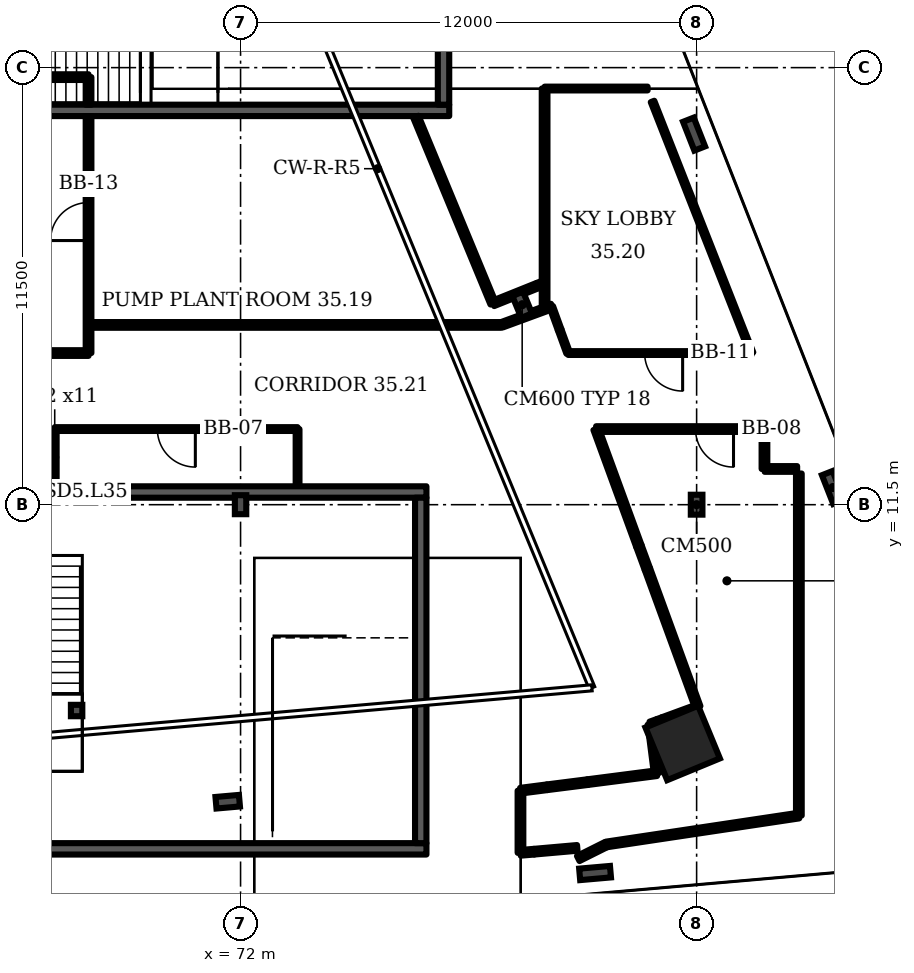
"""IFC4 building model, lengths in metres.
Left out: names, types, materials, properties, quantities, classifications, styles, units other than length and angle.
Written with IfcOpenShell. Run it as: python <this file> out.ifc"""

import sys

from ifc_helpers import new_model, si_unit, direction, frame, frame_2d, origin, origin_2d, place, context, subcontext, project, spatial, rectangle, i_section, extrude, element, fill, save


model = new_model("IFC4")
c1 = context("Model", 3, precision=1e-05, world=origin(), true_north=direction((0.0, 1.0)))
c2 = subcontext(c1, "Body", "Model", "MODEL_VIEW")
j1 = project(units=[si_unit("LENGTHUNIT", "METRE"), si_unit("PLANEANGLEUNIT", "RADIAN")], contexts=[c1])
p1 = place(None, origin())
s1 = spatial("IfcSite", under=j1, at=p1, CompositionType="ELEMENT")
p2 = place(p1, origin())
s2 = spatial("IfcBuilding", under=s1, at=p2, CompositionType="ELEMENT")
p3 = place(p2, frame((0.0, 0.0, 147.1)))
s3 = spatial("IfcBuildingStorey", under=s2, at=p3, CompositionType="ELEMENT", Elevation=147.1)
p4 = place(p3, frame((83.633, 5.231, 0.0), z_axis=(0.0, 0.0, 1.0), x_axis=(-0.381602, 0.924325, 0.0)))
e1 = element("IfcColumn", 1, at=p4, inside=s3, PredefinedType="COLUMN", context=c2, shape_type="SweptSolid", body=[
    extrude(rectangle(XDim=1.5, YDim=1.5, at=origin_2d()), origin(), (0.0, 0.0, 1.0), 4.8),
])
for number, where, z_axis, x_axis in (
    (2, (71.662, 3.685, 0.0), (0.0, 0.0, 1.0), (0.087, -0.996, 0.0)),
    (3, (79.41, 16.762, 0.0), (0.0, 0.0, 1.0), (0.924, 0.382, 0.0)),
):
    element("IfcColumn", number, at=place(p3, frame(where, z_axis=z_axis, x_axis=x_axis)), inside=s3, PredefinedType="COLUMN", context=c2, shape_type="SweptSolid", body=[
        extrude(i_section(OverallWidth=0.305, OverallDepth=0.62, WebThickness=0.021, FlangeThickness=0.04, FilletRadius=0.027, at=origin_2d()), origin(), (0.0, 0.0, 1.0), 4.8),
    ])
p5 = place(p3, frame((72.0, 11.5, 0.0), z_axis=(0.0, 0.0, 1.0), x_axis=(1.0, 0.0, 0.0)))
e4 = element("IfcColumn", 4, at=p5, inside=s3, PredefinedType="COLUMN", context=c2, shape_type="SweptSolid", body=[
    extrude(i_section(OverallWidth=0.3, OverallDepth=0.5, WebThickness=0.014, FlangeThickness=0.028, FilletRadius=0.027, at=origin_2d()), origin(), (0.0, 0.0, 1.0), 4.8),
])
for number, where, z_axis, x_axis in (
    (5, (81.328, 1.808, 0.0), (0.0, 0.0, 1.0), (0.087, -0.996, 0.0)),
    (6, (87.587, 11.952, 0.0), (0.0, 0.0, 1.0), (0.931, 0.366, 0.0)),
    (7, (83.933, 21.251, 0.0), (0.0, 0.0, 1.0), (0.931, 0.366, 0.0)),
):
    element("IfcColumn", number, at=place(p3, frame(where, z_axis=z_axis, x_axis=x_axis)), inside=s3, PredefinedType="COLUMN", context=c2, shape_type="SweptSolid", body=[
        extrude(i_section(OverallWidth=0.303, OverallDepth=0.814, WebThickness=0.021, FlangeThickness=0.04, FilletRadius=0.03, at=origin_2d()), origin(), (0.0, 0.0, 1.0), 4.8),
    ])
p6 = place(p3, frame((84.0, 11.5, 0.0), z_axis=(0.0, 0.0, 1.0), x_axis=(1.0, 0.0, 0.0)))
e8 = element("IfcColumn", 8, at=p6, inside=s3, PredefinedType="COLUMN", context=c2, shape_type="SweptSolid", body=[
    extrude(i_section(OverallWidth=0.306, OverallDepth=0.524, WebThickness=0.021, FlangeThickness=0.04, FilletRadius=0.027, at=origin_2d()), origin(), (0.0, 0.0, 1.0), 4.8),
])
p7 = place(p3, frame((63.786, 11.834, 0.0), z_axis=(0.0, 0.0, 1.0), x_axis=(1.0, 0.0, 0.0)))
e9 = element("IfcWall", 9, at=p7, inside=s3, PredefinedType="SHEAR", context=c2, shape_type="SweptSolid", body=[
    extrude(rectangle(XDim=13.105, YDim=0.3, at=frame_2d((6.552, 0.0))), origin(), (0.0, 0.0, 1.0), 4.4),
])
p8 = place(p7, frame((1.575, 0.0, 0.0)))
e10 = element("IfcOpeningElement", 10, at=p8, cuts=e9, PredefinedType="OPENING", context=c2, shape_type="SweptSolid", body=[
    extrude(rectangle(XDim=1.2, YDim=2.1, at=frame_2d((0.6, 1.05))), frame((0.0, 0.16, 0.0), z_axis=(0.0, -1.0, 0.0), x_axis=(1.0, 0.0, 0.0)), (0.0, 0.0, 1.0), 0.32),
])
p9 = place(p3, frame((52.0, 15.49, 0.0), z_axis=(0.0, 0.0, 1.0), x_axis=(1.0, 0.0, 0.0)))
e11 = element("IfcWall", 11, at=p9, inside=s3, PredefinedType="PARTITIONING", context=c2, shape_type="SweptSolid", body=[
    extrude(rectangle(XDim=16.0, YDim=0.15, at=frame_2d((8.0, 0.0))), origin(), (0.0, 0.0, 1.0), 4.4),
])
p10 = place(p9, frame((11.981, 0.0, 0.0)))
e12 = element("IfcOpeningElement", 12, at=p10, cuts=e11, PredefinedType="OPENING", context=c2, shape_type="SweptSolid", body=[
    extrude(rectangle(XDim=1.0, YDim=2.1, at=frame_2d((0.5, 1.05))), frame((0.0, 0.085, 0.0), z_axis=(0.0, -1.0, 0.0), x_axis=(1.0, 0.0, 0.0)), (0.0, 0.0, 1.0), 0.17),
])
p11 = place(p3, frame((67.11, 12.004, 0.0), z_axis=(0.0, 0.0, 1.0), x_axis=(0.0, 1.0, 0.0)))
e13 = element("IfcWall", 13, at=p11, inside=s3, PredefinedType="PARTITIONING", context=c2, shape_type="SweptSolid", body=[
    extrude(rectangle(XDim=1.486, YDim=0.1, at=frame_2d((0.743, 0.0))), origin(), (0.0, 0.0, 1.0), 4.4),
])
p12 = place(p3, frame((67.11, 13.49, 0.0), z_axis=(0.0, 0.0, 1.0), x_axis=(1.0, 0.0, 0.0)))
e14 = element("IfcWall", 14, at=p12, inside=s3, PredefinedType="PARTITIONING", context=c2, shape_type="SweptSolid", body=[
    extrude(rectangle(XDim=6.39, YDim=0.1, at=frame_2d((3.195, 0.0))), origin(), (0.0, 0.0, 1.0), 4.4),
])
p13 = place(p12, frame((2.7, 0.0, 0.0)))
e15 = element("IfcOpeningElement", 15, at=p13, cuts=e14, PredefinedType="OPENING", context=c2, shape_type="SweptSolid", body=[
    extrude(rectangle(XDim=1.0, YDim=2.1, at=frame_2d((0.5, 1.05))), frame((0.0, 0.06, 0.0), z_axis=(0.0, -1.0, 0.0), x_axis=(1.0, 0.0, 0.0)), (0.0, 0.0, 1.0), 0.12),
])
p14 = place(p3, frame((68.0, 15.49, 0.0), z_axis=(0.0, 0.0, 1.0), x_axis=(0.0, 1.0, 0.0)))
e16 = element("IfcWall", 16, at=p14, inside=s3, PredefinedType="PARTITIONING", context=c2, shape_type="SweptSolid", body=[
    extrude(rectangle(XDim=6.235, YDim=0.15, at=frame_2d((3.118, 0.0))), origin(), (0.0, 0.0, 1.0), 4.4),
])
p15 = place(p14, frame((2.96, 0.0, 0.0)))
e17 = element("IfcOpeningElement", 17, at=p15, cuts=e16, PredefinedType="OPENING", context=c2, shape_type="SweptSolid", body=[
    extrude(rectangle(XDim=1.0, YDim=2.1, at=frame_2d((0.5, 1.05))), frame((0.0, 0.085, 0.0), z_axis=(0.0, -1.0, 0.0), x_axis=(1.0, 0.0, 0.0)), (0.0, 0.0, 1.0), 0.17),
])
p16 = place(p3, frame((68.0, 16.23, 0.0), z_axis=(0.0, 0.0, 1.0), x_axis=(1.0, 0.0, 0.0)))
e18 = element("IfcWall", 18, at=p16, inside=s3, PredefinedType="PARTITIONING", context=c2, shape_type="SweptSolid", body=[
    extrude(rectangle(XDim=10.86, YDim=0.15, at=frame_2d((5.43, 0.0))), origin(), (0.0, 0.0, 1.0), 4.4),
])
p17 = place(p3, frame((73.5, 12.004, 0.0), z_axis=(0.0, 0.0, 1.0), x_axis=(0.0, 1.0, 0.0)))
e19 = element("IfcWall", 19, at=p17, inside=s3, PredefinedType="PARTITIONING", context=c2, shape_type="SweptSolid", body=[
    extrude(rectangle(XDim=1.486, YDim=0.1, at=frame_2d((0.743, 0.0))), origin(), (0.0, 0.0, 1.0), 4.4),
])
p18 = place(p3, frame((78.645, 16.795, 0.0), z_axis=(0.0, 0.0, 1.0), x_axis=(0.927928, 0.372759, 0.0)))
e20 = element("IfcWall", 20, at=p18, inside=s3, PredefinedType="PARTITIONING", context=c2, shape_type="SweptSolid", body=[
    extrude(rectangle(XDim=1.261, YDim=0.15, at=frame_2d((0.63, 0.0))), origin(), (0.0, 0.0, 1.0), 4.4),
])
p19 = place(p3, frame((78.645, 16.795, 0.0), z_axis=(0.0, 0.0, 1.0), x_axis=(-0.382344, 0.924021, 0.0)))
e21 = element("IfcWall", 21, at=p19, inside=s3, PredefinedType="PARTITIONING", context=c2, shape_type="SweptSolid", body=[
    extrude(rectangle(XDim=5.314, YDim=0.15, at=frame_2d((2.657, 0.0))), origin(), (0.0, 0.0, 1.0), 4.4),
])
p20 = place(p3, frame((78.88, 16.235, 0.0), z_axis=(0.0, 0.0, 1.0), x_axis=(0.938647, 0.344869, 0.0)))
e22 = element("IfcWall", 22, at=p20, inside=s3, PredefinedType="PARTITIONING", context=c2, shape_type="SweptSolid", body=[
    extrude(rectangle(XDim=1.247, YDim=0.15, at=frame_2d((0.623, 0.0))), origin(), (0.0, 0.0, 1.0), 4.4),
])
p21 = place(p3, frame((79.365, 2.34, 0.0), z_axis=(0.0, 0.0, 1.0), x_axis=(0.0, 1.0, 0.0)))
e23 = element("IfcWall", 23, at=p21, inside=s3, PredefinedType="PARTITIONING", context=c2, shape_type="SweptSolid", body=[
    extrude(rectangle(XDim=1.635, YDim=0.15, at=frame_2d((0.817, 0.0))), origin(), (0.0, 0.0, 1.0), 4.4),
])
p22 = place(p3, frame((79.365, 2.34, 0.0), z_axis=(0.0, 0.0, 1.0), x_axis=(0.996537, 0.083101, 0.0)))
e24 = element("IfcWall", 24, at=p22, inside=s3, PredefinedType="PARTITIONING", context=c2, shape_type="SweptSolid", body=[
    extrude(rectangle(XDim=0.361, YDim=0.15, at=frame_2d((0.181, 0.0))), origin(), (0.0, 0.0, 1.0), 4.4),
])
p23 = place(p3, frame((79.365, 3.975, 0.0), z_axis=(0.0, 0.0, 1.0), x_axis=(0.991865, 0.127313, 0.0)))
e25 = element("IfcWall", 25, at=p23, inside=s3, PredefinedType="PARTITIONING", context=c2, shape_type="SweptSolid", body=[
    extrude(rectangle(XDim=0.706, YDim=0.15, at=frame_2d((0.353, 0.0))), origin(), (0.0, 0.0, 1.0), 4.4),
])
p24 = place(p3, frame((79.725, 2.37, 0.0), z_axis=(0.0, 0.0, 1.0), x_axis=(0.996148, 0.087637, 0.0)))
e26 = element("IfcWall", 26, at=p24, inside=s3, PredefinedType="PARTITIONING", context=c2, shape_type="SweptSolid", body=[
    extrude(rectangle(XDim=1.139, YDim=0.15, at=frame_2d((0.57, 0.0))), origin(), (0.0, 0.0, 1.0), 4.4),
])
p25 = place(p3, frame((79.82, 17.265, 0.0), z_axis=(0.0, 0.0, 1.0), x_axis=(0.922795, 0.385281, 0.0)))
e27 = element("IfcWall", 27, at=p25, inside=s3, PredefinedType="PARTITIONING", context=c2, shape_type="SweptSolid", body=[
    extrude(rectangle(XDim=0.13, YDim=0.15, at=frame_2d((0.065, 0.0))), origin(), (0.0, 0.0, 1.0), 4.4),
])
p26 = place(p3, frame((80.0, 16.71, 0.0), z_axis=(0.0, 0.0, 1.0), x_axis=(0.0, 1.0, 0.0)))
e28 = element("IfcWall", 28, at=p26, inside=s3, PredefinedType="PARTITIONING", context=c2, shape_type="SweptSolid", body=[
    extrude(rectangle(XDim=5.74, YDim=0.15, at=frame_2d((2.87, 0.0))), origin(), (0.0, 0.0, 1.0), 4.4),
])
p27 = place(p3, frame((80.0, 22.45, 0.0), z_axis=(0.0, 0.0, 1.0), x_axis=(1.0, 0.0, 0.0)))
e29 = element("IfcWall", 29, at=p27, inside=s3, PredefinedType="PARTITIONING", context=c2, shape_type="SweptSolid", body=[
    extrude(rectangle(XDim=2.71, YDim=0.1, at=frame_2d((1.355, 0.0))), origin(), (0.0, 0.0, 1.0), 4.4),
])
p28 = place(p3, frame((80.025, 16.71, 0.0), z_axis=(0.0, 0.0, 1.0), x_axis=(1.0, 0.0, 0.0)))
e30 = element("IfcWall", 30, at=p28, inside=s3, PredefinedType="PARTITIONING", context=c2, shape_type="SweptSolid", body=[
    extrude(rectangle(XDim=0.145, YDim=0.15, at=frame_2d((0.073, 0.0))), origin(), (0.0, 0.0, 1.0), 4.4),
])
p29 = place(p3, frame((80.065, 4.065, 0.0), z_axis=(0.0, 0.0, 1.0), x_axis=(0.992059, 0.12577, 0.0)))
e31 = element("IfcWall", 31, at=p29, inside=s3, PredefinedType="PARTITIONING", context=c2, shape_type="SweptSolid", body=[
    extrude(rectangle(XDim=1.073, YDim=0.15, at=frame_2d((0.537, 0.0))), origin(), (0.0, 0.0, 1.0), 4.4),
])
p30 = place(p3, frame((80.395, 16.105, 0.0), z_axis=(0.0, 0.0, 1.0), x_axis=(-0.341711, 0.9398, 0.0)))
e32 = element("IfcWall", 32, at=p30, inside=s3, PredefinedType="PARTITIONING", context=c2, shape_type="SweptSolid", body=[
    extrude(rectangle(XDim=0.644, YDim=0.1, at=frame_2d((0.322, 0.0))), origin(), (0.0, 0.0, 1.0), 4.4),
])
p31 = place(p3, frame((80.62, 15.49, 0.0), z_axis=(0.0, 0.0, 1.0), x_axis=(1.0, 0.0, 0.0)))
e33 = element("IfcWall", 33, at=p31, inside=s3, PredefinedType="PARTITIONING", context=c2, shape_type="SweptSolid", body=[
    extrude(rectangle(XDim=4.825, YDim=0.1, at=frame_2d((2.413, 0.0))), origin(), (0.0, 0.0, 1.0), 4.4),
])
p32 = place(p31, frame((2.012, 0.0, 0.0)))
e34 = element("IfcOpeningElement", 34, at=p32, cuts=e33, PredefinedType="OPENING", context=c2, shape_type="SweptSolid", body=[
    extrude(rectangle(XDim=1.0, YDim=2.1, at=frame_2d((0.5, 1.05))), frame((0.0, 0.06, 0.0), z_axis=(0.0, -1.0, 0.0), x_axis=(1.0, 0.0, 0.0)), (0.0, 0.0, 1.0), 0.12),
])
p33 = place(p3, frame((80.62, 15.49, 0.0), z_axis=(0.0, 0.0, 1.0), x_axis=(-0.343719, 0.939076, 0.0)))
e35 = element("IfcWall", 35, at=p33, inside=s3, PredefinedType="PARTITIONING", context=c2, shape_type="SweptSolid", body=[
    extrude(rectangle(XDim=0.655, YDim=0.1, at=frame_2d((0.327, 0.0))), origin(), (0.0, 0.0, 1.0), 4.4),
])
p34 = place(p3, frame((80.885, 2.19, 0.0), z_axis=(0.0, 0.0, 1.0), x_axis=(0.894365, 0.44733, 0.0)))
e36 = element("IfcWall", 36, at=p34, inside=s3, PredefinedType="PARTITIONING", context=c2, shape_type="SweptSolid", body=[
    extrude(rectangle(XDim=0.827, YDim=0.15, at=frame_2d((0.414, 0.0))), origin(), (0.0, 0.0, 1.0), 4.4),
])
p35 = place(p3, frame((81.13, 4.2, 0.0), z_axis=(0.0, 0.0, 1.0), x_axis=(0.991763, 0.128111, 0.0)))
e37 = element("IfcWall", 37, at=p35, inside=s3, PredefinedType="PARTITIONING", context=c2, shape_type="SweptSolid", body=[
    extrude(rectangle(XDim=1.835, YDim=0.15, at=frame_2d((0.917, 0.0))), origin(), (0.0, 0.0, 1.0), 4.4),
])
p36 = place(p3, frame((81.355, 13.49, 0.0), z_axis=(0.0, 0.0, 1.0), x_axis=(1.0, 0.0, 0.0)))
e38 = element("IfcWall", 38, at=p36, inside=s3, PredefinedType="PARTITIONING", context=c2, shape_type="SweptSolid", body=[
    extrude(rectangle(XDim=4.43, YDim=0.15, at=frame_2d((2.215, 0.0))), origin(), (0.0, 0.0, 1.0), 4.4),
])
p37 = place(p36, frame((2.616, 0.0, 0.0)))
e39 = element("IfcOpeningElement", 39, at=p37, cuts=e38, PredefinedType="OPENING", context=c2, shape_type="SweptSolid", body=[
    extrude(rectangle(XDim=1.0, YDim=2.1, at=frame_2d((0.5, 1.05))), frame((0.0, 0.085, 0.0), z_axis=(0.0, -1.0, 0.0), x_axis=(1.0, 0.0, 0.0)), (0.0, 0.0, 1.0), 0.17),
])
p38 = place(p3, frame((81.625, 2.56, 0.0), z_axis=(0.0, 0.0, 1.0), x_axis=(0.98893, 0.148392, 0.0)))
e40 = element("IfcWall", 40, at=p38, inside=s3, PredefinedType="PARTITIONING", context=c2, shape_type="SweptSolid", body=[
    extrude(rectangle(XDim=5.122, YDim=0.15, at=frame_2d((2.561, 0.0))), origin(), (0.0, 0.0, 1.0), 4.4),
])
p39 = place(p3, frame((82.48, 10.415, 0.0), z_axis=(0.0, 0.0, 1.0), x_axis=(-0.343587, 0.939123, 0.0)))
e41 = element("IfcWall", 41, at=p39, inside=s3, PredefinedType="PARTITIONING", context=c2, shape_type="SweptSolid", body=[
    extrude(rectangle(XDim=3.274, YDim=0.15, at=frame_2d((1.637, 0.0))), origin(), (0.0, 0.0, 1.0), 4.4),
])
p40 = place(p3, frame((82.705, 9.805, 0.0), z_axis=(0.0, 0.0, 1.0), x_axis=(-0.34614, 0.938182, 0.0)))
e42 = element("IfcWall", 42, at=p40, inside=s3, PredefinedType="PARTITIONING", context=c2, shape_type="SweptSolid", body=[
    extrude(rectangle(XDim=0.65, YDim=0.15, at=frame_2d((0.325, 0.0))), origin(), (0.0, 0.0, 1.0), 4.4),
])
p41 = place(p3, frame((82.785, 5.72, 0.0), z_axis=(0.0, 0.0, 1.0), x_axis=(0.94113, 0.338053, 0.0)))
e43 = element("IfcWall", 43, at=p41, inside=s3, PredefinedType="PARTITIONING", context=c2, shape_type="SweptSolid", body=[
    extrude(rectangle(XDim=0.207, YDim=0.15, at=frame_2d((0.104, 0.0))), origin(), (0.0, 0.0, 1.0), 4.4),
])
p42 = place(p3, frame((82.95, 4.435, 0.0), z_axis=(0.0, 0.0, 1.0), x_axis=(-0.127397, 0.99185, 0.0)))
e44 = element("IfcWall", 44, at=p42, inside=s3, PredefinedType="PARTITIONING", context=c2, shape_type="SweptSolid", body=[
    extrude(rectangle(XDim=1.295, YDim=0.15, at=frame_2d((0.648, 0.0))), origin(), (0.0, 0.0, 1.0), 4.4),
])
p43 = place(p3, frame((82.98, 5.79, 0.0), z_axis=(0.0, 0.0, 1.0), x_axis=(0.941078, 0.3382, 0.0)))
e45 = element("IfcWall", 45, at=p43, inside=s3, PredefinedType="PARTITIONING", context=c2, shape_type="SweptSolid", body=[
    extrude(rectangle(XDim=0.133, YDim=0.15, at=frame_2d((0.066, 0.0))), origin(), (0.0, 0.0, 1.0), 4.4),
])
p44 = place(p3, frame((83.105, 5.835, 0.0), z_axis=(0.0, 0.0, 1.0), x_axis=(0.938584, 0.345064, 0.0)))
e46 = element("IfcWall", 46, at=p44, inside=s3, PredefinedType="PARTITIONING", context=c2, shape_type="SweptSolid", body=[
    extrude(rectangle(XDim=0.986, YDim=0.15, at=frame_2d((0.493, 0.0))), origin(), (0.0, 0.0, 1.0), 4.4),
])
p45 = place(p3, frame((84.03, 6.175, 0.0), z_axis=(0.0, 0.0, 1.0), x_axis=(-0.342884, 0.939377, 0.0)))
e47 = element("IfcWall", 47, at=p45, inside=s3, PredefinedType="PARTITIONING", context=c2, shape_type="SweptSolid", body=[
    extrude(rectangle(XDim=3.864, YDim=0.15, at=frame_2d((1.932, 0.0))), origin(), (0.0, 0.0, 1.0), 4.4),
])
p46 = place(p3, frame((85.445, 15.49, 0.0), z_axis=(0.0, 0.0, 1.0), x_axis=(-0.366214, 0.930531, 0.0)))
e48 = element("IfcWall", 48, at=p46, inside=s3, PredefinedType="PARTITIONING", context=c2, shape_type="SweptSolid", body=[
    extrude(rectangle(XDim=7.115, YDim=0.1, at=frame_2d((3.557, 0.0))), origin(), (0.0, 0.0, 1.0), 4.4),
])
p47 = place(p3, frame((85.785, 12.44, 0.0), z_axis=(0.0, 0.0, 1.0), x_axis=(0.0, 1.0, 0.0)))
e49 = element("IfcWall", 49, at=p47, inside=s3, PredefinedType="PARTITIONING", context=c2, shape_type="SweptSolid", body=[
    extrude(rectangle(XDim=1.05, YDim=0.15, at=frame_2d((0.525, 0.0))), origin(), (0.0, 0.0, 1.0), 4.4),
])
p48 = place(p3, frame((85.79, 12.44, 0.0), z_axis=(0.0, 0.0, 1.0), x_axis=(1.0, 0.0, 0.0)))
e50 = element("IfcWall", 50, at=p48, inside=s3, PredefinedType="PARTITIONING", context=c2, shape_type="SweptSolid", body=[
    extrude(rectangle(XDim=0.855, YDim=0.15, at=frame_2d((0.427, 0.0))), origin(), (0.0, 0.0, 1.0), 4.4),
])
p49 = place(p3, frame((86.69, 3.32, 0.0), z_axis=(0.0, 0.0, 1.0), x_axis=(0.0, 1.0, 0.0)))
e51 = element("IfcWall", 51, at=p49, inside=s3, PredefinedType="PARTITIONING", context=c2, shape_type="SweptSolid", body=[
    extrude(rectangle(XDim=9.0, YDim=0.15, at=frame_2d((4.5, 0.0))), origin(), (0.0, 0.0, 1.0), 4.4),
])
p50 = place(p3, frame((64.205, 22.75, 0.0), z_axis=(0.0, 0.0, 1.0), x_axis=(1.0, 0.0, 0.0)))
e52 = element("IfcWall", 52, at=p50, inside=s3, PredefinedType="PARTITIONING", context=c2, shape_type="SweptSolid", body=[
    extrude(rectangle(XDim=3.795, YDim=0.15, at=frame_2d((1.898, 0.0))), origin(), (0.0, 0.0, 1.0), 4.4),
])
p51 = place(p3, frame((68.0, 22.025, 0.0), z_axis=(0.0, 0.0, 1.0), x_axis=(0.0, 1.0, 0.0)))
e53 = element("IfcWall", 53, at=p51, inside=s3, PredefinedType="PARTITIONING", context=c2, shape_type="SweptSolid", body=[
    extrude(rectangle(XDim=0.725, YDim=0.15, at=frame_2d((0.363, 0.0))), origin(), (0.0, 0.0, 1.0), 4.4),
])
p52 = place(p3, frame((63.786, 2.445, 0.0), z_axis=(0.0, 0.0, 1.0), x_axis=(1.0, 0.0, 0.0)))
e54 = element("IfcWall", 54, at=p52, inside=s3, PredefinedType="SHEAR", context=c2, shape_type="SweptSolid", body=[
    extrude(rectangle(XDim=13.105, YDim=0.3, at=frame_2d((6.552, 0.0))), origin(), (0.0, 0.0, 1.0), 4.4),
])
p53 = place(p3, frame((76.741, 2.595, 0.0), z_axis=(0.0, 0.0, 1.0), x_axis=(0.0, 1.0, 0.0)))
e55 = element("IfcWall", 55, at=p53, inside=s3, PredefinedType="SHEAR", context=c2, shape_type="SweptSolid", body=[
    extrude(rectangle(XDim=9.089, YDim=0.3, at=frame_2d((4.544, 0.0))), origin(), (0.0, 0.0, 1.0), 4.4),
])
p54 = place(p3, frame((64.205, 21.875, 0.0), z_axis=(0.0, 0.0, 1.0), x_axis=(1.0, 0.0, 0.0)))
e56 = element("IfcWall", 56, at=p54, inside=s3, PredefinedType="SHEAR", context=c2, shape_type="SweptSolid", body=[
    extrude(rectangle(XDim=13.286, YDim=0.3, at=frame_2d((6.643, 0.0))), origin(), (0.0, 0.0, 1.0), 4.4),
])
p55 = place(p3, frame((77.34, 22.025, 0.0), z_axis=(0.0, 0.0, 1.0), x_axis=(0.0, 1.0, 0.0)))
e57 = element("IfcWall", 57, at=p55, inside=s3, PredefinedType="SHEAR", context=c2, shape_type="SweptSolid", body=[
    extrude(rectangle(XDim=5.4, YDim=0.3, at=frame_2d((2.7, 0.0))), origin(), (0.0, 0.0, 1.0), 4.4),
])
p56 = place(p3, frame((67.686, 6.084, 0.0), z_axis=(0.0, 0.0, 1.0), x_axis=(1.0, 0.0, 0.0)))
e58 = element("IfcColumn", 58, at=p56, inside=s3, PredefinedType="COLUMN", context=c2, shape_type="SweptSolid", body=[
    extrude(rectangle(XDim=0.3, YDim=0.3, at=origin_2d()), origin(), (0.0, 0.0, 1.0), 2.2),
])
p57 = place(p13, origin())
e59 = element("IfcDoor", 59, at=p57, inside=s3, OperationType="SINGLE_SWING_RIGHT", PredefinedType="DOOR", context=c2, shape_type="SweptSolid", body=[
    extrude(rectangle(XDim=1.0, YDim=2.1, at=frame_2d((0.5, 1.05))), frame((0.0, 0.025, 0.0), z_axis=(0.0, -1.0, 0.0), x_axis=(1.0, 0.0, 0.0)), (0.0, 0.0, 1.0), 0.05),
])
fill(e15, e59)
p58 = place(p37, origin())
e60 = element("IfcDoor", 60, at=p58, inside=s3, OperationType="SINGLE_SWING_RIGHT", PredefinedType="DOOR", context=c2, shape_type="SweptSolid", body=[
    extrude(rectangle(XDim=1.0, YDim=2.1, at=frame_2d((0.5, 1.05))), frame((0.0, 0.025, 0.0), z_axis=(0.0, -1.0, 0.0), x_axis=(1.0, 0.0, 0.0)), (0.0, 0.0, 1.0), 0.05),
])
fill(e39, e60)
p59 = place(p32, origin())
e61 = element("IfcDoor", 61, at=p59, inside=s3, OperationType="SINGLE_SWING_RIGHT", PredefinedType="DOOR", context=c2, shape_type="SweptSolid", body=[
    extrude(rectangle(XDim=1.0, YDim=2.1, at=frame_2d((0.5, 1.05))), frame((0.0, 0.025, 0.0), z_axis=(0.0, -1.0, 0.0), x_axis=(1.0, 0.0, 0.0)), (0.0, 0.0, 1.0), 0.05),
])
fill(e34, e61)
p60 = place(p15, origin())
e62 = element("IfcDoor", 62, at=p60, inside=s3, OperationType="SINGLE_SWING_LEFT", PredefinedType="DOOR", context=c2, shape_type="SweptSolid", body=[
    extrude(rectangle(XDim=1.0, YDim=2.1, at=frame_2d((0.5, 1.05))), frame((0.0, 0.025, 0.0), z_axis=(0.0, -1.0, 0.0), x_axis=(1.0, 0.0, 0.0)), (0.0, 0.0, 1.0), 0.05),
])
fill(e17, e62)
save(model, sys.argv[1])
